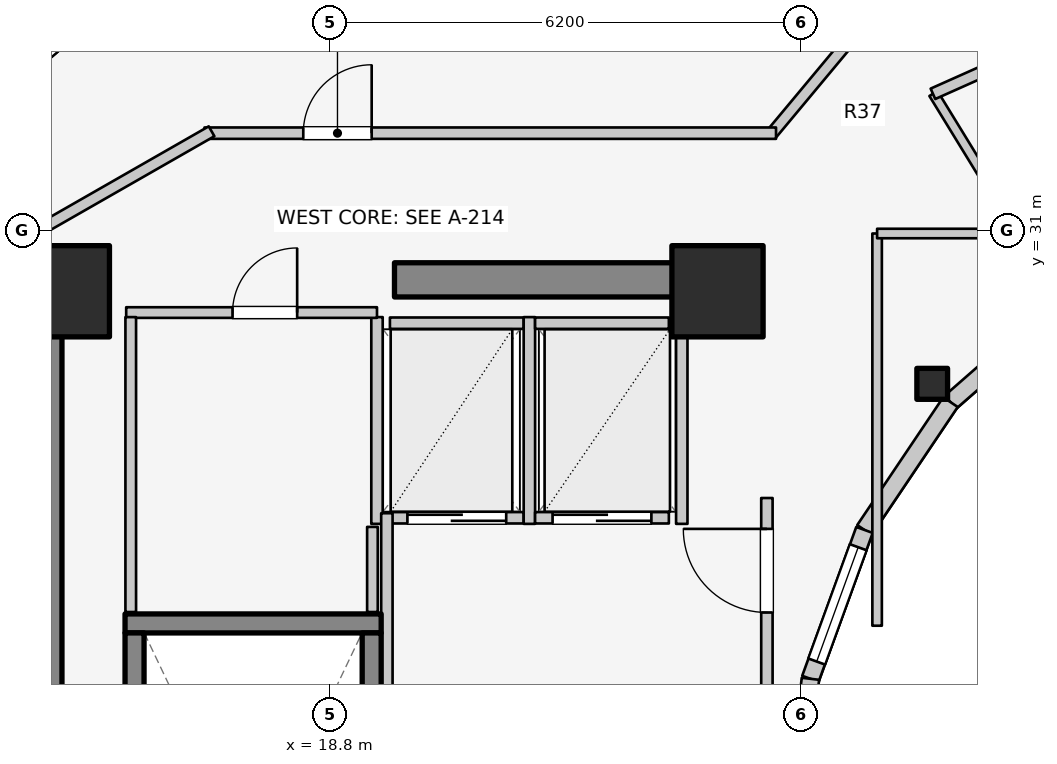
"""IFC4 building model, lengths in metres.
Left out: names, types, materials, properties, quantities, classifications, styles, units other than length and angle.
Written with IfcOpenShell. Run it as: python <this file> out.ifc"""

import sys

from ifc_helpers import new_model, si_unit, direction, frame, frame_2d, origin, origin_2d, place, context, subcontext, project, spatial, rectangle, i_section, extrude, element, fill, save


model = new_model("IFC4")
c1 = context("Model", 3, precision=1e-05, world=origin(), true_north=direction((0.0, 1.0)))
c2 = subcontext(c1, "Body", "Model", "MODEL_VIEW")
j1 = project(units=[si_unit("LENGTHUNIT", "METRE"), si_unit("PLANEANGLEUNIT", "RADIAN")], contexts=[c1])
p1 = place(None, origin())
s1 = spatial("IfcSite", under=j1, at=p1, CompositionType="ELEMENT")
p2 = place(p1, origin())
s2 = spatial("IfcBuilding", under=s1, at=p2, CompositionType="ELEMENT")
p3 = place(p2, frame((0.0, 0.0, 249.6)))
s3 = spatial("IfcBuildingStorey", under=s2, at=p3, CompositionType="ELEMENT", Elevation=249.6)
p4 = place(p3, frame((15.05, 17.05, 0.0), z_axis=(0.0, 0.0, 1.0), x_axis=(0.0, 1.0, 0.0)))
e1 = element("IfcWall", 1, at=p4, inside=s3, PredefinedType="SHEAR", context=c2, shape_type="SweptSolid", body=[
    extrude(rectangle(XDim=12.8, YDim=0.45, at=frame_2d((6.4, 0.0))), origin(), (0.0, 0.0, 1.0), 3.6),
])
p5 = place(p3, frame((19.65, 30.35, 0.0), z_axis=(0.0, 0.0, 1.0), x_axis=(1.0, 0.0, 0.0)))
e2 = element("IfcWall", 2, at=p5, inside=s3, PredefinedType="SHEAR", context=c2, shape_type="SweptSolid", body=[
    extrude(rectangle(XDim=4.5, YDim=0.45, at=frame_2d((2.25, 0.0))), origin(), (0.0, 0.0, 1.0), 3.6),
])
p6 = place(p3, frame((16.105, 25.83, 0.0), z_axis=(0.0, 0.0, 1.0), x_axis=(1.0, 0.0, 0.0)))
e3 = element("IfcWall", 3, at=p6, inside=s3, PredefinedType="SOLIDWALL", context=c2, shape_type="SweptSolid", body=[
    extrude(rectangle(XDim=3.37, YDim=0.25, at=frame_2d((1.685, 0.0))), origin(), (0.0, 0.0, 1.0), 3.6),
])
for number, where, z_axis, x_axis in (
    (4, (16.23, 17.895, 0.0), (0.0, 0.0, 1.0), (0.0, 1.0, 0.0)),
    (5, (19.35, 17.895, 0.0), (0.0, 0.0, 1.0), (0.0, 1.0, 0.0)),
):
    element("IfcWall", number, at=place(p3, frame(where, z_axis=z_axis, x_axis=x_axis)), inside=s3, PredefinedType="SOLIDWALL", context=c2, shape_type="SweptSolid", body=[
        extrude(rectangle(XDim=7.81, YDim=0.25, at=frame_2d((3.905, 0.0))), origin(), (0.0, 0.0, 1.0), 3.6),
    ])
for number, where, z_axis, x_axis in (
    (6, (23.9, 30.2, 0.0), (0.0, 0.0, 1.0), (1.0, 0.0, 0.0)),
    (7, (15.3, 30.2, 0.0), (0.0, 0.0, 1.0), (1.0, 0.0, 0.0)),
):
    element("IfcColumn", number, at=place(p3, frame(where, z_axis=z_axis, x_axis=x_axis)), inside=s3, PredefinedType="COLUMN", context=c2, shape_type="SweptSolid", body=[
        extrude(rectangle(XDim=1.2, YDim=1.2, at=origin_2d()), origin(), (0.0, 0.0, 1.0), 3.6),
    ])
p7 = place(p3, frame((26.725, 28.982, 0.0), z_axis=(0.0, 0.0, 1.0), x_axis=(1.0, 0.0, 0.0)))
e8 = element("IfcColumn", 8, at=p7, inside=s3, PredefinedType="COLUMN", context=c2, shape_type="SweptSolid", body=[
    extrude(i_section(OverallWidth=0.404, OverallDepth=0.407, WebThickness=0.027, FlangeThickness=0.044, FilletRadius=0.025, at=origin_2d()), origin(), (0.0, 0.0, 1.0), 3.6),
])
p8 = place(p3, frame((28.44, 30.032, 0.0), z_axis=(0.0, 0.0, 1.0), x_axis=(-0.752576694707, -0.658504607869, 0.0)))
e9 = element("IfcWall", 9, at=p8, inside=s3, PredefinedType="STANDARD", context=c2, shape_type="SweptSolid", body=[
    extrude(rectangle(XDim=1.959, YDim=0.23, at=frame_2d((0.98, 0.0))), origin(), (0.0, 0.0, 1.0), 2.6),
])
p9 = place(p3, frame((26.965, 28.742, 0.0), z_axis=(0.0, 0.0, 1.0), x_axis=(-0.558197800898, -0.829707909492, 0.0)))
e10 = element("IfcWall", 10, at=p9, inside=s3, PredefinedType="STANDARD", context=c2, shape_type="SweptSolid", body=[
    extrude(rectangle(XDim=2.027, YDim=0.23, at=frame_2d((1.013, 0.0))), origin(), (0.0, 0.0, 1.0), 2.6),
])
p10 = place(p3, frame((25.834, 27.06, 0.0), z_axis=(0.0, 0.0, 1.0), x_axis=(-0.341423187295, -0.93990968033, 0.0)))
e11 = element("IfcWall", 11, at=p10, inside=s3, PredefinedType="STANDARD", context=c2, shape_type="SweptSolid", body=[
    extrude(rectangle(XDim=2.084, YDim=0.23, at=frame_2d((1.042, 0.0))), origin(), (0.0, 0.0, 1.0), 3.28),
])
p11 = place(p10, frame((0.242, 0.0, 0.85)))
e12 = element("IfcOpeningElement", 12, at=p11, cuts=e11, PredefinedType="OPENING", context=c2, shape_type="SweptSolid", body=[
    extrude(rectangle(XDim=1.6, YDim=1.65, at=frame_2d((0.8, 0.825))), frame((0.0, 0.125, 0.0), z_axis=(0.0, -1.0, 0.0), x_axis=(1.0, 0.0, 0.0)), (0.0, 0.0, 1.0), 0.25),
])
p12 = place(p3, frame((25.123, 25.102, 0.0), z_axis=(0.0, 0.0, 1.0), x_axis=(-0.114711713601, -0.993398823617, 0.0)))
e13 = element("IfcWall", 13, at=p12, inside=s3, PredefinedType="STANDARD", context=c2, shape_type="SweptSolid", body=[
    extrude(rectangle(XDim=2.115, YDim=0.23, at=frame_2d((1.058, 0.0))), origin(), (0.0, 0.0, 1.0), 3.28),
])
p13 = place(p3, frame((16.442, 34.572, 0.0), z_axis=(0.0, 0.0, 1.0), x_axis=(-0.759587504333, -0.650405122413, 0.0)))
e14 = element("IfcWall", 14, at=p13, inside=s3, PredefinedType="STANDARD", context=c2, shape_type="SweptSolid", body=[
    extrude(rectangle(XDim=4.217, YDim=0.26, at=frame_2d((2.109, 0.0))), origin(), (0.0, 0.0, 1.0), 3.29),
])
p14 = place(p13, frame((1.359, 0.0, 0.75)))
e15 = element("IfcOpeningElement", 15, at=p14, cuts=e14, PredefinedType="OPENING", context=c2, shape_type="SweptSolid", body=[
    extrude(rectangle(XDim=1.5, YDim=1.6, at=frame_2d((0.75, 0.8))), frame((0.0, 0.14, 0.0), z_axis=(0.0, -1.0, 0.0), x_axis=(1.0, 0.0, 0.0)), (0.0, 0.0, 1.0), 0.28),
])
p15 = place(p3, frame((19.59, 27.22, 0.0), z_axis=(0.0, 0.0, 1.0), x_axis=(1.0, 0.0, 0.0)))
e16 = element("IfcWall", 16, at=p15, inside=s3, PredefinedType="SOLIDWALL", context=c2, shape_type="SweptSolid", body=[
    extrude(rectangle(XDim=1.76, YDim=0.15, at=frame_2d((0.88, 0.0))), origin(), (0.0, 0.0, 1.0), 3.295),
])
p16 = place(p15, frame((0.23, 0.0, 0.0)))
e17 = element("IfcOpeningElement", 17, at=p16, cuts=e16, PredefinedType="OPENING", context=c2, shape_type="SweptSolid", body=[
    extrude(rectangle(XDim=1.3, YDim=2.1, at=frame_2d((0.65, 1.05))), frame((0.0, 0.085, 0.0), z_axis=(0.0, -1.0, 0.0), x_axis=(1.0, 0.0, 0.0)), (0.0, 0.0, 1.0), 0.17),
])
p17 = place(p3, frame((19.59, 29.78, 0.0), z_axis=(0.0, 0.0, 1.0), x_axis=(1.0, 0.0, 0.0)))
e18 = element("IfcWall", 18, at=p17, inside=s3, PredefinedType="SOLIDWALL", context=c2, shape_type="SweptSolid", body=[
    extrude(rectangle(XDim=1.76, YDim=0.15, at=frame_2d((0.88, 0.0))), origin(), (0.0, 0.0, 1.0), 3.295),
])
for number, where, z_axis, x_axis in (
    (19, (19.42, 27.14, 0.0), (0.0, 0.0, 1.0), (0.0, 1.0, 0.0)),
    (20, (21.425, 27.14, 0.0), (0.0, 0.0, 1.0), (0.0, 1.0, 0.0)),
):
    element("IfcWall", number, at=place(p3, frame(where, z_axis=z_axis, x_axis=x_axis)), inside=s3, PredefinedType="SOLIDWALL", context=c2, shape_type="SweptSolid", body=[
        extrude(rectangle(XDim=2.72, YDim=0.15, at=frame_2d((1.36, 0.0))), origin(), (0.0, 0.0, 1.0), 3.295),
    ])
p18 = place(p3, frame((21.5, 27.22, 0.0), z_axis=(0.0, 0.0, 1.0), x_axis=(1.0, 0.0, 0.0)))
e21 = element("IfcWall", 21, at=p18, inside=s3, PredefinedType="SOLIDWALL", context=c2, shape_type="SweptSolid", body=[
    extrude(rectangle(XDim=1.76, YDim=0.15, at=frame_2d((0.88, 0.0))), origin(), (0.0, 0.0, 1.0), 3.295),
])
p19 = place(p18, frame((0.23, 0.0, 0.0)))
e22 = element("IfcOpeningElement", 22, at=p19, cuts=e21, PredefinedType="OPENING", context=c2, shape_type="SweptSolid", body=[
    extrude(rectangle(XDim=1.3, YDim=2.1, at=frame_2d((0.65, 1.05))), frame((0.0, 0.085, 0.0), z_axis=(0.0, -1.0, 0.0), x_axis=(1.0, 0.0, 0.0)), (0.0, 0.0, 1.0), 0.17),
])
p20 = place(p3, frame((21.5, 29.78, 0.0), z_axis=(0.0, 0.0, 1.0), x_axis=(1.0, 0.0, 0.0)))
e23 = element("IfcWall", 23, at=p20, inside=s3, PredefinedType="SOLIDWALL", context=c2, shape_type="SweptSolid", body=[
    extrude(rectangle(XDim=1.76, YDim=0.15, at=frame_2d((0.88, 0.0))), origin(), (0.0, 0.0, 1.0), 3.295),
])
p21 = place(p3, frame((23.43, 27.14, 0.0), z_axis=(0.0, 0.0, 1.0), x_axis=(0.0, 1.0, 0.0)))
e24 = element("IfcWall", 24, at=p21, inside=s3, PredefinedType="SOLIDWALL", context=c2, shape_type="SweptSolid", body=[
    extrude(rectangle(XDim=2.72, YDim=0.15, at=frame_2d((1.36, 0.0))), origin(), (0.0, 0.0, 1.0), 3.295),
])
p22 = place(p3, frame((19.55, 24.08, 0.0), z_axis=(0.0, 0.0, 1.0), x_axis=(0.0, 1.0, 0.0)))
e25 = element("IfcWall", 25, at=p22, inside=s3, PredefinedType="PARTITIONING", context=c2, shape_type="SweptSolid", body=[
    extrude(rectangle(XDim=3.2, YDim=0.15, at=frame_2d((1.6, 0.0))), origin(), (0.0, 0.0, 1.0), 3.295),
])
p23 = place(p3, frame((24.55, 24.08, 0.0), z_axis=(0.0, 0.0, 1.0), x_axis=(0.0, 1.0, 0.0)))
e26 = element("IfcWall", 26, at=p23, inside=s3, PredefinedType="PARTITIONING", context=c2, shape_type="SweptSolid", body=[
    extrude(rectangle(XDim=3.4, YDim=0.15, at=frame_2d((1.7, 0.0))), origin(), (0.0, 0.0, 1.0), 3.295),
])
p24 = place(p23, frame((1.894, 0.0, 0.0)))
e27 = element("IfcOpeningElement", 27, at=p24, cuts=e26, PredefinedType="OPENING", context=c2, shape_type="SweptSolid", body=[
    extrude(rectangle(XDim=1.1, YDim=2.1, at=frame_2d((0.55, 1.05))), frame((0.0, 0.085, 0.0), z_axis=(0.0, -1.0, 0.0), x_axis=(1.0, 0.0, 0.0)), (0.0, 0.0, 1.0), 0.17),
])
p25 = place(p3, frame((16.12, 29.92, 0.0), z_axis=(0.0, 0.0, 1.0), x_axis=(1.0, 0.0, 0.0)))
e28 = element("IfcWall", 28, at=p25, inside=s3, PredefinedType="PLUMBINGWALL", context=c2, shape_type="SweptSolid", body=[
    extrude(rectangle(XDim=3.3, YDim=0.14, at=frame_2d((1.65, 0.0))), origin(), (0.0, 0.0, 1.0), 3.295),
])
p26 = place(p25, frame((1.399, 0.0, 0.0)))
e29 = element("IfcOpeningElement", 29, at=p26, cuts=e28, PredefinedType="OPENING", context=c2, shape_type="SweptSolid", body=[
    extrude(rectangle(XDim=0.85, YDim=2.05, at=frame_2d((0.425, 1.025))), frame((0.0, 0.08, 0.0), z_axis=(0.0, -1.0, 0.0), x_axis=(1.0, 0.0, 0.0)), (0.0, 0.0, 1.0), 0.16),
])
p27 = place(p3, frame((16.18, 25.98, 0.0), z_axis=(0.0, 0.0, 1.0), x_axis=(0.0, 1.0, 0.0)))
e30 = element("IfcWall", 30, at=p27, inside=s3, PredefinedType="PLUMBINGWALL", context=c2, shape_type="SweptSolid", body=[
    extrude(rectangle(XDim=3.88, YDim=0.14, at=frame_2d((1.94, 0.0))), origin(), (0.0, 0.0, 1.0), 3.295),
])
p28 = place(p3, frame((19.36, 25.98, 0.0), z_axis=(0.0, 0.0, 1.0), x_axis=(0.0, 1.0, 0.0)))
e31 = element("IfcWall", 31, at=p28, inside=s3, PredefinedType="PLUMBINGWALL", context=c2, shape_type="SweptSolid", body=[
    extrude(rectangle(XDim=1.12, YDim=0.14, at=frame_2d((0.56, 0.0))), origin(), (0.0, 0.0, 1.0), 3.295),
])
p29 = place(p3, frame((28.45, 30.015, 0.0), z_axis=(0.0, 0.0, 1.0), x_axis=(-0.522763432117, 0.852477796802, 0.0)))
e32 = element("IfcWall", 32, at=p29, inside=s3, PredefinedType="PARTITIONING", context=c2, shape_type="SweptSolid", body=[
    extrude(rectangle(XDim=3.269, YDim=0.125, at=frame_2d((1.635, 0.0))), origin(), (0.0, 0.0, 1.0), 2.672),
])
p30 = place(p3, frame((29.28, 33.933, 0.0), z_axis=(0.0, 0.0, 1.0), x_axis=(-0.913254317828, -0.407389924971, 0.0)))
e33 = element("IfcWall", 33, at=p30, inside=s3, PredefinedType="PARTITIONING", context=c2, shape_type="SweptSolid", body=[
    extrude(rectangle(XDim=2.787, YDim=0.15, at=frame_2d((1.393, 0.0))), origin(), (0.0, 0.0, 1.0), 2.823),
])
p31 = place(p30, frame((0.918, 0.0, 0.0)))
e34 = element("IfcOpeningElement", 34, at=p31, cuts=e33, PredefinedType="OPENING", context=c2, shape_type="SweptSolid", body=[
    extrude(rectangle(XDim=0.95, YDim=2.1, at=frame_2d((0.475, 1.05))), frame((0.0, 0.085, 0.0), z_axis=(0.0, -1.0, 0.0), x_axis=(1.0, 0.0, 0.0)), (0.0, 0.0, 1.0), 0.17),
])
p32 = place(p3, frame((26.0, 25.8, 0.0), z_axis=(0.0, 0.0, 1.0), x_axis=(0.0, 1.0, 0.0)))
e35 = element("IfcWall", 35, at=p32, inside=s3, PredefinedType="PARTITIONING", context=c2, shape_type="SweptSolid", body=[
    extrude(rectangle(XDim=5.16, YDim=0.125, at=frame_2d((2.58, 0.0))), origin(), (0.0, 0.0, 1.0), 2.672),
])
p33 = place(p3, frame((26.0, 30.96, 0.0), z_axis=(0.0, 0.0, 1.0), x_axis=(1.0, 0.0, 0.0)))
e36 = element("IfcWall", 36, at=p33, inside=s3, PredefinedType="PARTITIONING", context=c2, shape_type="SweptSolid", body=[
    extrude(rectangle(XDim=2.6, YDim=0.125, at=frame_2d((1.3, 0.0))), origin(), (0.0, 0.0, 1.0), 2.816),
])
p34 = place(p3, frame((26.016, 33.955, 0.0), z_axis=(0.0, 0.0, 1.0), x_axis=(-0.64030392053, -0.76812166312, 0.0)))
e37 = element("IfcWall", 37, at=p34, inside=s3, PredefinedType="PARTITIONING", context=c2, shape_type="SweptSolid", body=[
    extrude(rectangle(XDim=2.21, YDim=0.15, at=frame_2d((1.105, 0.0))), origin(), (0.0, 0.0, 1.0), 2.816),
])
p35 = place(p3, frame((17.15, 32.28, 0.0), z_axis=(0.0, 0.0, 1.0), x_axis=(1.0, 0.0, 0.0)))
e38 = element("IfcWall", 38, at=p35, inside=s3, PredefinedType="PARTITIONING", context=c2, shape_type="SweptSolid", body=[
    extrude(rectangle(XDim=7.52, YDim=0.15, at=frame_2d((3.76, 0.0))), origin(), (0.0, 0.0, 1.0), 2.816),
])
p36 = place(p35, frame((1.3, 0.0, 0.0)))
e39 = element("IfcOpeningElement", 39, at=p36, cuts=e38, PredefinedType="OPENING", context=c2, shape_type="SweptSolid", body=[
    extrude(rectangle(XDim=0.9, YDim=2.1, at=frame_2d((0.45, 1.05))), frame((0.0, 0.085, 0.0), z_axis=(0.0, -1.0, 0.0), x_axis=(1.0, 0.0, 0.0)), (0.0, 0.0, 1.0), 0.17),
])
p37 = place(p3, frame((17.243, 32.305, 0.0), z_axis=(0.0, 0.0, 1.0), x_axis=(-0.867991349648, -0.496579315857, 0.0)))
e40 = element("IfcWall", 40, at=p37, inside=s3, PredefinedType="PARTITIONING", context=c2, shape_type="SweptSolid", body=[
    extrude(rectangle(XDim=2.567, YDim=0.15, at=frame_2d((1.283, 0.0))), origin(), (0.0, 0.0, 1.0), 2.66),
])
p38 = place(p11, origin())
e41 = element("IfcWindow", 41, at=p38, inside=s3, PartitioningType="SINGLE_PANEL", PredefinedType="WINDOW", context=c2, shape_type="SweptSolid", body=[
    extrude(rectangle(XDim=1.6, YDim=1.65, at=frame_2d((0.8, 0.825))), frame((0.0, 0.03, 0.0), z_axis=(0.0, -1.0, 0.0), x_axis=(1.0, 0.0, 0.0)), (0.0, 0.0, 1.0), 0.06),
])
fill(e12, e41)
p39 = place(p14, origin())
e42 = element("IfcWindow", 42, at=p39, inside=s3, PartitioningType="SINGLE_PANEL", PredefinedType="WINDOW", context=c2, shape_type="SweptSolid", body=[
    extrude(rectangle(XDim=1.5, YDim=1.6, at=frame_2d((0.75, 0.8))), frame((0.0, 0.03, 0.0), z_axis=(0.0, -1.0, 0.0), x_axis=(1.0, 0.0, 0.0)), (0.0, 0.0, 1.0), 0.06),
])
fill(e15, e42)
p40 = place(p16, origin())
e43 = element("IfcDoor", 43, at=p40, inside=s3, OperationType="DOUBLE_DOOR_SLIDING", PredefinedType="DOOR", context=c2, shape_type="SweptSolid", body=[
    extrude(rectangle(XDim=1.3, YDim=2.1, at=frame_2d((0.65, 1.05))), frame((0.0, 0.025, 0.0), z_axis=(0.0, -1.0, 0.0), x_axis=(1.0, 0.0, 0.0)), (0.0, 0.0, 1.0), 0.05),
])
fill(e17, e43)
p41 = place(p19, origin())
e44 = element("IfcDoor", 44, at=p41, inside=s3, OperationType="DOUBLE_DOOR_SLIDING", PredefinedType="DOOR", context=c2, shape_type="SweptSolid", body=[
    extrude(rectangle(XDim=1.3, YDim=2.1, at=frame_2d((0.65, 1.05))), frame((0.0, 0.025, 0.0), z_axis=(0.0, -1.0, 0.0), x_axis=(1.0, 0.0, 0.0)), (0.0, 0.0, 1.0), 0.05),
])
fill(e22, e44)
p42 = place(p24, origin())
e45 = element("IfcDoor", 45, at=p42, inside=s3, OperationType="SINGLE_SWING_RIGHT", PredefinedType="DOOR", context=c2, shape_type="SweptSolid", body=[
    extrude(rectangle(XDim=1.1, YDim=2.1, at=frame_2d((0.55, 1.05))), frame((0.0, 0.025, 0.0), z_axis=(0.0, -1.0, 0.0), x_axis=(1.0, 0.0, 0.0)), (0.0, 0.0, 1.0), 0.05),
])
fill(e27, e45)
p43 = place(p26, origin())
e46 = element("IfcDoor", 46, at=p43, inside=s3, OperationType="SINGLE_SWING_RIGHT", PredefinedType="DOOR", context=c2, shape_type="SweptSolid", body=[
    extrude(rectangle(XDim=0.85, YDim=2.05, at=frame_2d((0.425, 1.025))), frame((0.0, 0.025, 0.0), z_axis=(0.0, -1.0, 0.0), x_axis=(1.0, 0.0, 0.0)), (0.0, 0.0, 1.0), 0.05),
])
fill(e29, e46)
p44 = place(p36, origin())
e47 = element("IfcDoor", 47, at=p44, inside=s3, OperationType="SINGLE_SWING_RIGHT", PredefinedType="DOOR", context=c2, shape_type="SweptSolid", body=[
    extrude(rectangle(XDim=0.9, YDim=2.1, at=frame_2d((0.45, 1.05))), frame((0.0, 0.025, 0.0), z_axis=(0.0, -1.0, 0.0), x_axis=(1.0, 0.0, 0.0)), (0.0, 0.0, 1.0), 0.05),
])
fill(e39, e47)
save(model, sys.argv[1])
